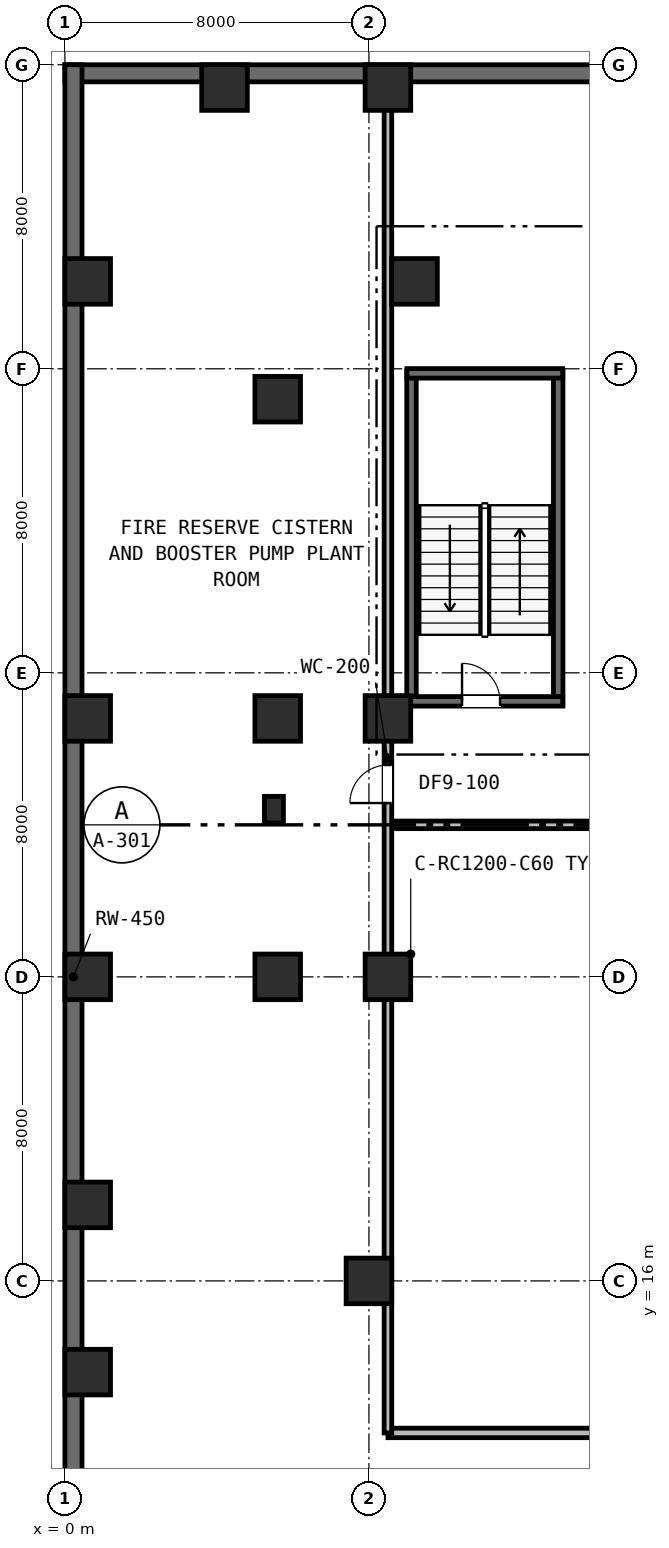
"""IFC4 building model, lengths in metres.
Left out: names, types, materials, properties, quantities, classifications, styles, units other than length and angle.
Written with IfcOpenShell. Run it as: python <this file> out.ifc"""

import sys

from ifc_helpers import new_model, si_unit, direction, frame, frame_2d, origin, origin_2d, place, context, subcontext, project, spatial, rectangle, extrude, element, fill, save


model = new_model("IFC4")
c1 = context("Model", 3, precision=1e-05, world=origin(), true_north=direction((0.0, 1.0)))
c2 = subcontext(c1, "Body", "Model", "MODEL_VIEW")
j1 = project(units=[si_unit("LENGTHUNIT", "METRE"), si_unit("PLANEANGLEUNIT", "RADIAN")], contexts=[c1])
p1 = place(None, origin())
s1 = spatial("IfcSite", under=j1, at=p1, CompositionType="ELEMENT")
p2 = place(p1, origin())
s2 = spatial("IfcBuilding", under=s1, at=p2, CompositionType="ELEMENT")
p3 = place(p2, frame((0.0, 0.0, -13.2)))
s3 = spatial("IfcBuildingStorey", under=s2, at=p3, CompositionType="ELEMENT", Elevation=-13.2)
p4 = place(p3, frame((0.0, 47.775, 0.0), z_axis=(0.0, 0.0, 1.0), x_axis=(1.0, 0.0, 0.0)))
e1 = element("IfcWall", 1, at=p4, inside=s3, PredefinedType="USERDEFINED", context=c2, shape_type="SweptSolid", body=[
    extrude(rectangle(XDim=56.0, YDim=0.45, at=frame_2d((28.0, 0.0))), origin(), (0.0, 0.0, 1.0), 3.8),
])
p5 = place(p3, frame((0.225, 0.0, 0.0), z_axis=(0.0, 0.0, 1.0), x_axis=(0.0, 1.0, 0.0)))
e2 = element("IfcWall", 2, at=p5, inside=s3, PredefinedType="USERDEFINED", context=c2, shape_type="SweptSolid", body=[
    extrude(rectangle(XDim=48.0, YDim=0.45, at=frame_2d((24.0, 0.0))), origin(), (0.0, 0.0, 1.0), 3.8),
])
for number, where, z_axis, x_axis in (
    (3, (9.12, 31.15, 0.0), (0.0, 0.0, 1.0), (0.0, 1.0, 0.0)),
    (4, (12.98, 31.15, 0.0), (0.0, 0.0, 1.0), (0.0, 1.0, 0.0)),
):
    element("IfcWall", number, at=place(p3, frame(where, z_axis=z_axis, x_axis=x_axis)), inside=s3, PredefinedType="SHEAR", context=c2, shape_type="SweptSolid", body=[
        extrude(rectangle(XDim=8.8, YDim=0.25, at=frame_2d((4.4, 0.0))), origin(), (0.0, 0.0, 1.0), 3.8),
    ])
p6 = place(p3, frame((9.0, 39.88, 0.0), z_axis=(0.0, 0.0, 1.0), x_axis=(1.0, 0.0, 0.0)))
e5 = element("IfcWall", 5, at=p6, inside=s3, PredefinedType="SHEAR", context=c2, shape_type="SweptSolid", body=[
    extrude(rectangle(XDim=4.1, YDim=0.25, at=frame_2d((2.05, 0.0))), origin(), (0.0, 0.0, 1.0), 3.8),
])
p7 = place(p3, frame((9.0, 31.25, 0.0), z_axis=(0.0, 0.0, 1.0), x_axis=(1.0, 0.0, 0.0)))
e6 = element("IfcWall", 6, at=p7, inside=s3, PredefinedType="SHEAR", context=c2, shape_type="SweptSolid", body=[
    extrude(rectangle(XDim=4.1, YDim=0.25, at=frame_2d((2.05, 0.0))), origin(), (0.0, 0.0, 1.0), 3.8),
])
p8 = place(p7, frame((1.45, 0.0, 0.0)))
e7 = element("IfcOpeningElement", 7, at=p8, cuts=e6, PredefinedType="OPENING", context=c2, shape_type="SweptSolid", body=[
    extrude(rectangle(XDim=1.0, YDim=2.15, at=frame_2d((0.5, 1.075))), frame((0.0, 0.135, 0.0), z_axis=(0.0, -1.0, 0.0), x_axis=(1.0, 0.0, 0.0)), (0.0, 0.0, 1.0), 0.27),
])
for number, where, z_axis, x_axis in (
    (8, (8.5, 24.0, 0.0), (0.0, 0.0, 1.0), (1.0, 0.0, 0.0)),
    (9, (5.6, 24.0, 0.0), (0.0, 0.0, 1.0), (1.0, 0.0, 0.0)),
    (10, (5.6, 30.8, 0.0), (0.0, 0.0, 1.0), (1.0, 0.0, 0.0)),
    (11, (5.6, 39.2, 0.0), (0.0, 0.0, 1.0), (1.0, 0.0, 0.0)),
    (12, (8.5, 30.8, 0.0), (0.0, 0.0, 1.0), (1.0, 0.0, 0.0)),
    (13, (9.2, 42.3, 0.0), (0.0, 0.0, 1.0), (1.0, 0.0, 0.0)),
    (14, (0.6, 24.0, 0.0), (0.0, 0.0, 1.0), (1.0, 0.0, 0.0)),
    (15, (0.6, 30.8, 0.0), (0.0, 0.0, 1.0), (1.0, 0.0, 0.0)),
    (16, (0.6, 42.3, 0.0), (0.0, 0.0, 1.0), (1.0, 0.0, 0.0)),
    (17, (4.2, 47.4, 0.0), (0.0, 0.0, 1.0), (1.0, 0.0, 0.0)),
    (18, (8.5, 47.4, 0.0), (0.0, 0.0, 1.0), (1.0, 0.0, 0.0)),
    (19, (0.6, 13.6, 0.0), (0.0, 0.0, 1.0), (1.0, 0.0, 0.0)),
    (20, (0.6, 18.0, 0.0), (0.0, 0.0, 1.0), (1.0, 0.0, 0.0)),
    (21, (8.0, 16.0, 0.0), (0.0, 0.0, 1.0), (1.0, 0.0, 0.0)),
):
    element("IfcColumn", number, at=place(p3, frame(where, z_axis=z_axis, x_axis=x_axis)), inside=s3, PredefinedType="COLUMN", context=c2, shape_type="SweptSolid", body=[
        extrude(rectangle(XDim=1.2, YDim=1.2, at=origin_2d()), origin(), (0.0, 0.0, 1.0), 3.8),
    ])
p9 = place(p3, frame((8.5, 12.0, 0.0), z_axis=(0.0, 0.0, 1.0), x_axis=(1.0, 0.0, 0.0)))
e22 = element("IfcWall", 22, at=p9, inside=s3, PredefinedType="STANDARD", context=c2, shape_type="SweptSolid", body=[
    extrude(rectangle(XDim=32.3, YDim=0.25, at=frame_2d((16.15, 0.0))), origin(), (0.0, 0.0, 1.0), 3.15),
])
p10 = place(p9, frame((9.5, 0.0, 0.0)))
e23 = element("IfcOpeningElement", 23, at=p10, cuts=e22, PredefinedType="OPENING", context=c2, shape_type="SweptSolid", body=[
    extrude(rectangle(XDim=4.2, YDim=2.95, at=frame_2d((2.1, 1.475))), frame((0.0, 0.135, 0.0), z_axis=(0.0, -1.0, 0.0), x_axis=(1.0, 0.0, 0.0)), (0.0, 0.0, 1.0), 0.27),
])
p11 = place(p3, frame((8.5, 28.0, 0.0), z_axis=(0.0, 0.0, 1.0), x_axis=(1.0, 0.0, 0.0)))
e24 = element("IfcWall", 24, at=p11, inside=s3, PredefinedType="PARTITIONING", context=c2, shape_type="SweptSolid", body=[
    extrude(rectangle(XDim=32.3, YDim=0.2, at=frame_2d((16.15, 0.0))), origin(), (0.0, 0.0, 1.0), 2.88),
])
p12 = place(p11, frame((16.0, 0.0, 0.0)))
e25 = element("IfcOpeningElement", 25, at=p12, cuts=e24, PredefinedType="OPENING", context=c2, shape_type="SweptSolid", body=[
    extrude(rectangle(XDim=1.1, YDim=2.15, at=frame_2d((0.55, 1.075))), frame((0.0, 0.11, 0.0), z_axis=(0.0, -1.0, 0.0), x_axis=(1.0, 0.0, 0.0)), (0.0, 0.0, 1.0), 0.22),
])
p13 = place(p3, frame((8.5, 12.0, 0.0), z_axis=(0.0, 0.0, 1.0), x_axis=(0.0, 1.0, 0.0)))
e26 = element("IfcWall", 26, at=p13, inside=s3, PredefinedType="PARTITIONING", context=c2, shape_type="SweptSolid", body=[
    extrude(rectangle(XDim=35.45, YDim=0.2, at=frame_2d((17.725, 0.0))), origin(), (0.0, 0.0, 1.0), 2.63),
])
p14 = place(p13, frame((16.574, 0.0, 0.0)))
e27 = element("IfcOpeningElement", 27, at=p14, cuts=e26, PredefinedType="OPENING", context=c2, shape_type="SweptSolid", body=[
    extrude(rectangle(XDim=1.0, YDim=2.15, at=frame_2d((0.5, 1.075))), frame((0.0, 0.11, 0.0), z_axis=(0.0, -1.0, 0.0), x_axis=(1.0, 0.0, 0.0)), (0.0, 0.0, 1.0), 0.22),
])
p15 = place(p3, frame((5.5, 28.4, 0.0), z_axis=(0.0, 0.0, 1.0), x_axis=(1.0, 0.0, 0.0)))
e28 = element("IfcColumn", 28, at=p15, inside=s3, PredefinedType="PILASTER", context=c2, shape_type="SweptSolid", body=[
    extrude(rectangle(XDim=0.5, YDim=0.7, at=origin_2d()), origin(), (0.0, 0.0, 1.0), 3.5),
])
p16 = place(p8, origin())
e29 = element("IfcDoor", 29, at=p16, inside=s3, OperationType="SINGLE_SWING_LEFT", PredefinedType="DOOR", context=c2, shape_type="SweptSolid", body=[
    extrude(rectangle(XDim=1.0, YDim=2.15, at=frame_2d((0.5, 1.075))), frame((0.0, 0.025, 0.0), z_axis=(0.0, -1.0, 0.0), x_axis=(1.0, 0.0, 0.0)), (0.0, 0.0, 1.0), 0.05),
])
fill(e7, e29)
p17 = place(p14, origin())
e30 = element("IfcDoor", 30, at=p17, inside=s3, OperationType="SINGLE_SWING_LEFT", PredefinedType="DOOR", context=c2, shape_type="SweptSolid", body=[
    extrude(rectangle(XDim=1.0, YDim=2.15, at=frame_2d((0.5, 1.075))), frame((0.0, 0.025, 0.0), z_axis=(0.0, -1.0, 0.0), x_axis=(1.0, 0.0, 0.0)), (0.0, 0.0, 1.0), 0.05),
])
fill(e27, e30)
save(model, sys.argv[1])
